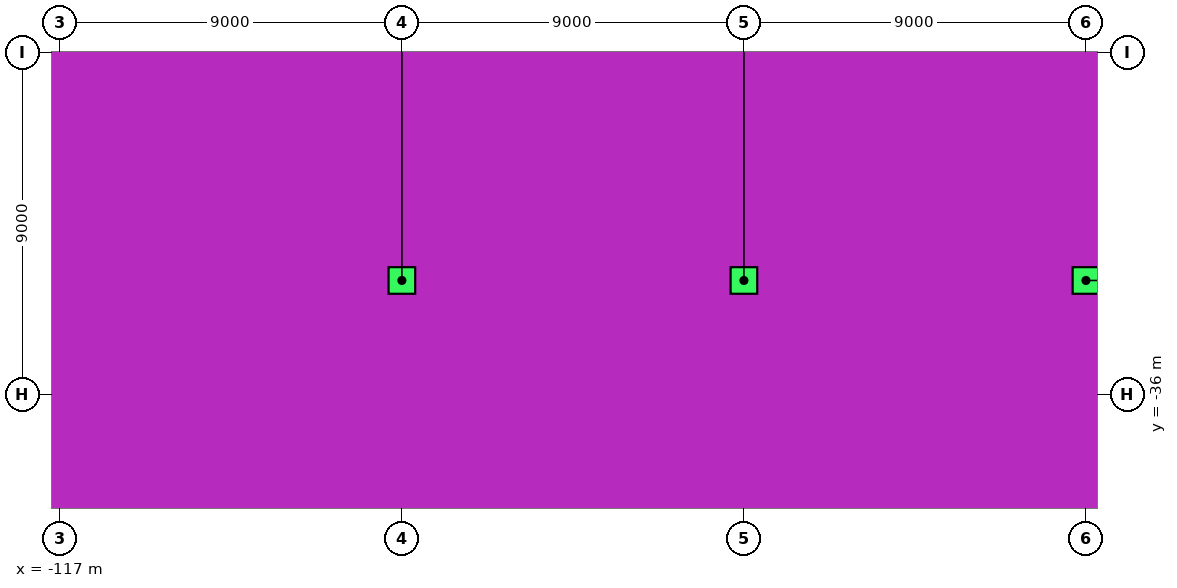
"""IFC4 building model, lengths in metres.
Left out: names, types, materials, properties, quantities, classifications, styles, units other than length and angle.
Written with IfcOpenShell. Run it as: python <this file> out.ifc"""

import sys

from ifc_helpers import new_model, si_unit, direction, frame, origin, origin_2d, place, context, subcontext, project, spatial, rectangle, extrude, element, save


model = new_model("IFC4")
c1 = context("Model", 3, precision=1e-05, world=origin(), true_north=direction((0.0, 1.0)))
c2 = subcontext(c1, "Body", "Model", "MODEL_VIEW")
j1 = project(units=[si_unit("LENGTHUNIT", "METRE"), si_unit("PLANEANGLEUNIT", "RADIAN")], contexts=[c1])
p1 = place(None, origin())
s1 = spatial("IfcSite", under=j1, at=p1, CompositionType="ELEMENT")
p2 = place(p1, origin())
s2 = spatial("IfcBuilding", under=s1, at=p2, CompositionType="ELEMENT")
p3 = place(p2, frame((0.0, 0.0, -4.5)))
s3 = spatial("IfcBuildingStorey", under=s2, at=p3, CompositionType="ELEMENT", Elevation=-4.5)
for number, where, z_axis, x_axis in (
    (1, (-108.0, -33.0, 0.0), (0.0, 0.0, 1.0), (1.0, 0.0, 0.0)),
    (2, (-99.0, -33.0, 0.0), (0.0, 0.0, 1.0), (1.0, 0.0, 0.0)),
    (3, (-90.0, -33.0, 0.0), (0.0, 0.0, 1.0), (1.0, 0.0, 0.0)),
):
    element("IfcColumn", number, at=place(p3, frame(where, z_axis=z_axis, x_axis=x_axis)), inside=s3, PredefinedType="COLUMN", context=c2, shape_type="SweptSolid", body=[
        extrude(rectangle(XDim=0.7, YDim=0.7, at=origin_2d()), origin(), (0.0, 0.0, 1.0), 4.0),
    ])
save(model, sys.argv[1])
